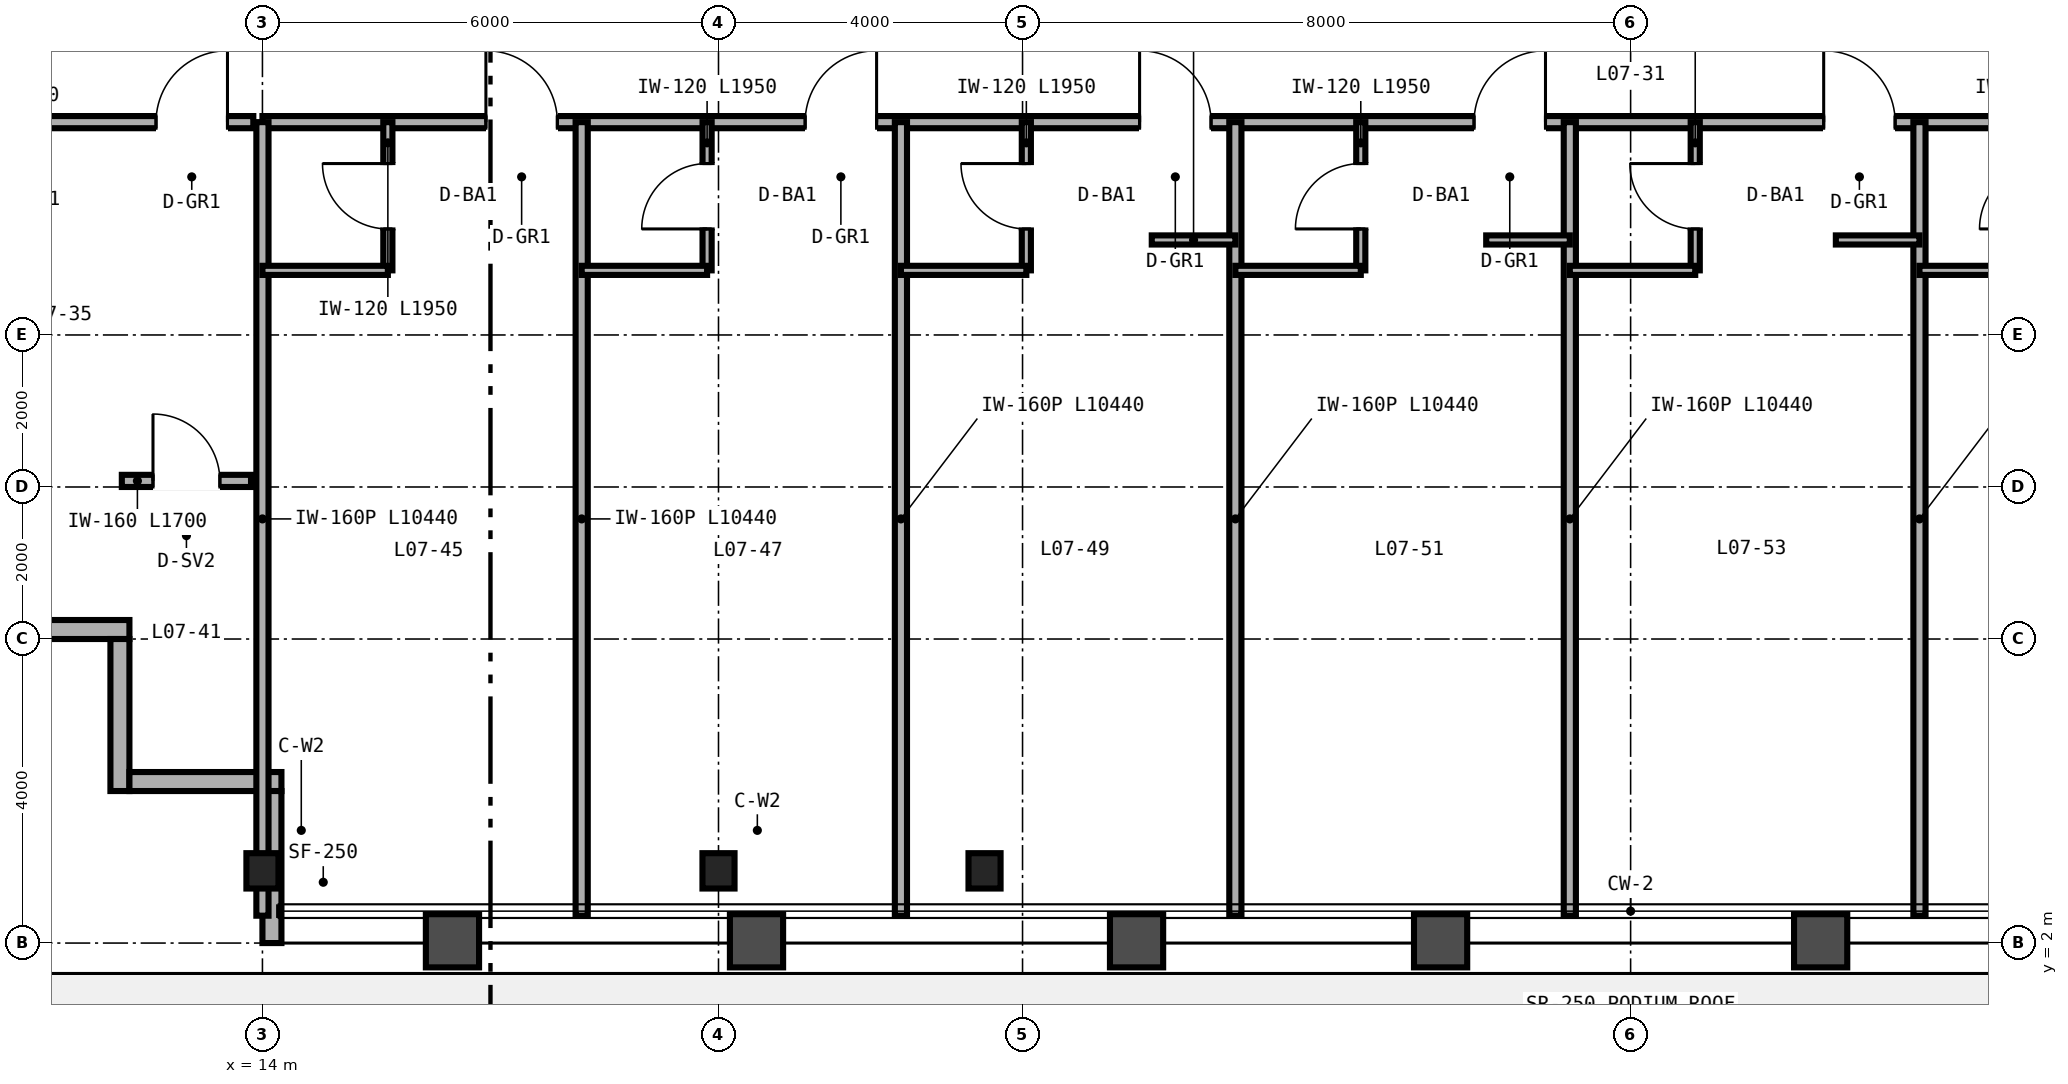
"""IFC4 building model, lengths in metres.
Left out: names, types, materials, properties, quantities, classifications, styles, units other than length and angle.
Written with IfcOpenShell. Run it as: python <this file> out.ifc"""

import sys

from ifc_helpers import new_model, si_unit, direction, frame, frame_2d, origin, origin_2d, place, context, subcontext, project, spatial, rectangle, i_section, extrude, source, transform, mapped, element, fill, save


model = new_model("IFC4")
c1 = context("Model", 3, precision=1e-05, world=origin(), true_north=direction((0.0, 1.0)))
c2 = subcontext(c1, "Body", "Model", "MODEL_VIEW")
j1 = project(units=[si_unit("LENGTHUNIT", "METRE"), si_unit("PLANEANGLEUNIT", "RADIAN")], contexts=[c1])
p1 = place(None, origin())
s1 = spatial("IfcSite", under=j1, at=p1, CompositionType="ELEMENT")
p2 = place(p1, origin())
s2 = spatial("IfcBuilding", under=s1, at=p2, CompositionType="ELEMENT")
p3 = place(p2, frame((0.0, 0.0, 34.8)))
s3 = spatial("IfcBuildingStorey", under=s2, at=p3, CompositionType="ELEMENT", Elevation=34.8)
m1 = source(origin(), c2, "Body", "SweptSolid", [
    extrude(i_section(OverallWidth=0.422, OverallDepth=0.465, WebThickness=0.045, FlangeThickness=0.073, FilletRadius=0.025, at=origin_2d()), origin(), (0.0, 0.0, 1.0), 3.35),
])
for number, where, z_axis, x_axis in (
    (1, (14.0, 2.95, 0.0), (0.0, 0.0, 1.0), (1.0, 0.0, 0.0)),
    (2, (20.0, 2.95, 0.0), (0.0, 0.0, 1.0), (1.0, 0.0, 0.0)),
    (3, (23.5, 2.95, 0.0), (0.0, 0.0, 1.0), (1.0, 0.0, 0.0)),
):
    element("IfcColumn", number, at=place(p3, frame(where, z_axis=z_axis, x_axis=x_axis)), inside=s3, PredefinedType="COLUMN", context=c2, shape_type="MappedRepresentation", body=[
        mapped(m1, transform((0.0, 0.0, 0.0), scale=1.0)),
    ])
for number, where, z_axis, x_axis in (
    (4, (10.25, 6.125, 0.0), (0.0, 0.0, 1.0), (1.0, 0.0, 0.0)),
    (5, (12.125, 6.0, 0.0), (0.0, 0.0, 1.0), (0.0, -1.0, 0.0)),
    (6, (12.25, 4.125, 0.0), (0.0, 0.0, 1.0), (1.0, 0.0, 0.0)),
):
    element("IfcWall", number, at=place(p3, frame(where, z_axis=z_axis, x_axis=x_axis)), inside=s3, PredefinedType="SOLIDWALL", context=c2, shape_type="SweptSolid", body=[
        extrude(rectangle(XDim=2.0, YDim=0.25, at=frame_2d((1.0, 0.0))), origin(), (0.0, 0.0, 1.0), 3.35),
    ])
p4 = place(p3, frame((14.125, 4.0, 0.0), z_axis=(0.0, 0.0, 1.0), x_axis=(0.0, -1.0, 0.0)))
e7 = element("IfcWall", 7, at=p4, inside=s3, PredefinedType="SOLIDWALL", context=c2, shape_type="SweptSolid", body=[
    extrude(rectangle(XDim=2.0, YDim=0.25, at=frame_2d((1.0, 0.0))), origin(), (0.0, 0.0, 1.0), 2.657),
])
p5 = place(p3, frame((8.2, 12.8, 0.0), z_axis=(0.0, 0.0, 1.0), x_axis=(1.0, 0.0, 0.0)))
e8 = element("IfcWall", 8, at=p5, inside=s3, PredefinedType="PARTITIONING", context=c2, shape_type="SweptSolid", body=[
    extrude(rectangle(XDim=5.68, YDim=0.16, at=frame_2d((2.84, 0.0))), origin(), (0.0, 0.0, 1.0), 3.35),
])
p6 = place(p5, frame((4.4, 0.0, 0.0)))
e9 = element("IfcOpeningElement", 9, at=p6, cuts=e8, PredefinedType="OPENING", context=c2, shape_type="SweptSolid", body=[
    extrude(rectangle(XDim=0.94, YDim=2.15, at=frame_2d((0.47, 1.075))), frame((0.0, 0.09, 0.0), z_axis=(0.0, -1.0, 0.0), x_axis=(1.0, 0.0, 0.0)), (0.0, 0.0, 1.0), 0.18),
])
p7 = place(p3, frame((12.15, 8.08, 0.0), z_axis=(0.0, 0.0, 1.0), x_axis=(1.0, 0.0, 0.0)))
e10 = element("IfcWall", 10, at=p7, inside=s3, PredefinedType="PARTITIONING", context=c2, shape_type="SweptSolid", body=[
    extrude(rectangle(XDim=1.7, YDim=0.16, at=frame_2d((0.85, 0.0))), origin(), (0.0, 0.0, 1.0), 3.35),
])
p8 = place(p7, frame((0.41, 0.0, 0.0)))
e11 = element("IfcOpeningElement", 11, at=p8, cuts=e10, PredefinedType="OPENING", context=c2, shape_type="SweptSolid", body=[
    extrude(rectangle(XDim=0.88, YDim=2.15, at=frame_2d((0.44, 1.075))), frame((0.0, 0.09, 0.0), z_axis=(0.0, -1.0, 0.0), x_axis=(1.0, 0.0, 0.0)), (0.0, 0.0, 1.0), 0.18),
])
p9 = place(p3, frame((14.0, 12.8, 0.0), z_axis=(0.0, 0.0, 1.0), x_axis=(1.0, 0.0, 0.0)))
e12 = element("IfcWall", 12, at=p9, inside=s3, PredefinedType="PARTITIONING", context=c2, shape_type="SweptSolid", body=[
    extrude(rectangle(XDim=36.0, YDim=0.16, at=frame_2d((18.0, 0.0))), origin(), (0.0, 0.0, 1.0), 2.571),
])
p10 = place(p9, frame((2.94, 0.0, 0.0)))
e13 = element("IfcOpeningElement", 13, at=p10, cuts=e12, PredefinedType="OPENING", context=c2, shape_type="SweptSolid", body=[
    extrude(rectangle(XDim=0.94, YDim=2.15, at=frame_2d((0.47, 1.075))), frame((0.0, 0.09, 0.0), z_axis=(0.0, -1.0, 0.0), x_axis=(1.0, 0.0, 0.0)), (0.0, 0.0, 1.0), 0.18),
])
p11 = place(p9, frame((7.14, 0.0, 0.0)))
e14 = element("IfcOpeningElement", 14, at=p11, cuts=e12, PredefinedType="OPENING", context=c2, shape_type="SweptSolid", body=[
    extrude(rectangle(XDim=0.94, YDim=2.15, at=frame_2d((0.47, 1.075))), frame((0.0, 0.09, 0.0), z_axis=(0.0, -1.0, 0.0), x_axis=(1.0, 0.0, 0.0)), (0.0, 0.0, 1.0), 0.18),
])
p12 = place(p9, frame((11.54, 0.0, 0.0)))
e15 = element("IfcOpeningElement", 15, at=p12, cuts=e12, PredefinedType="OPENING", context=c2, shape_type="SweptSolid", body=[
    extrude(rectangle(XDim=0.94, YDim=2.15, at=frame_2d((0.47, 1.075))), frame((0.0, 0.09, 0.0), z_axis=(0.0, -1.0, 0.0), x_axis=(1.0, 0.0, 0.0)), (0.0, 0.0, 1.0), 0.18),
])
p13 = place(p9, frame((15.94, 0.0, 0.0)))
e16 = element("IfcOpeningElement", 16, at=p13, cuts=e12, PredefinedType="OPENING", context=c2, shape_type="SweptSolid", body=[
    extrude(rectangle(XDim=0.94, YDim=2.15, at=frame_2d((0.47, 1.075))), frame((0.0, 0.09, 0.0), z_axis=(0.0, -1.0, 0.0), x_axis=(1.0, 0.0, 0.0)), (0.0, 0.0, 1.0), 0.18),
])
p14 = place(p9, frame((20.54, 0.0, 0.0)))
e17 = element("IfcOpeningElement", 17, at=p14, cuts=e12, PredefinedType="OPENING", context=c2, shape_type="SweptSolid", body=[
    extrude(rectangle(XDim=0.94, YDim=2.15, at=frame_2d((0.47, 1.075))), frame((0.0, 0.09, 0.0), z_axis=(0.0, -1.0, 0.0), x_axis=(1.0, 0.0, 0.0)), (0.0, 0.0, 1.0), 0.18),
])
p15 = place(p9, frame((24.84, 0.0, 0.0)))
e18 = element("IfcOpeningElement", 18, at=p15, cuts=e12, PredefinedType="OPENING", context=c2, shape_type="SweptSolid", body=[
    extrude(rectangle(XDim=0.94, YDim=2.15, at=frame_2d((0.47, 1.075))), frame((0.0, 0.09, 0.0), z_axis=(0.0, -1.0, 0.0), x_axis=(1.0, 0.0, 0.0)), (0.0, 0.0, 1.0), 0.18),
])
p16 = place(p9, frame((29.94, 0.0, 0.0)))
e19 = element("IfcOpeningElement", 19, at=p16, cuts=e12, PredefinedType="OPENING", context=c2, shape_type="SweptSolid", body=[
    extrude(rectangle(XDim=0.94, YDim=2.15, at=frame_2d((0.47, 1.075))), frame((0.0, 0.09, 0.0), z_axis=(0.0, -1.0, 0.0), x_axis=(1.0, 0.0, 0.0)), (0.0, 0.0, 1.0), 0.18),
])
p17 = place(p9, frame((34.74, 0.0, 0.0)))
e20 = element("IfcOpeningElement", 20, at=p17, cuts=e12, PredefinedType="OPENING", context=c2, shape_type="SweptSolid", body=[
    extrude(rectangle(XDim=0.94, YDim=2.15, at=frame_2d((0.47, 1.075))), frame((0.0, 0.09, 0.0), z_axis=(0.0, -1.0, 0.0), x_axis=(1.0, 0.0, 0.0)), (0.0, 0.0, 1.0), 0.18),
])
for number, where, z_axis, x_axis in (
    (21, (14.0, 2.36, 0.0), (0.0, 0.0, 1.0), (0.0, 1.0, 0.0)),
    (22, (18.2, 2.36, 0.0), (0.0, 0.0, 1.0), (0.0, 1.0, 0.0)),
):
    element("IfcWall", number, at=place(p3, frame(where, z_axis=z_axis, x_axis=x_axis)), inside=s3, PredefinedType="PARTITIONING", context=c2, shape_type="SweptSolid", body=[
        extrude(rectangle(XDim=10.44, YDim=0.16, at=frame_2d((5.22, 0.0))), origin(), (0.0, 0.0, 1.0), 2.657),
    ])
p18 = place(p3, frame((15.65, 10.85, 0.0), z_axis=(0.0, 0.0, 1.0), x_axis=(0.0, 1.0, 0.0)))
e23 = element("IfcWall", 23, at=p18, inside=s3, PredefinedType="PARTITIONING", context=c2, shape_type="SweptSolid", body=[
    extrude(rectangle(XDim=1.95, YDim=0.12, at=frame_2d((0.975, 0.0))), origin(), (0.0, 0.0, 1.0), 3.35),
])
p19 = place(p18, frame((0.545, 0.0, 0.0)))
e24 = element("IfcOpeningElement", 24, at=p19, cuts=e23, PredefinedType="OPENING", context=c2, shape_type="SweptSolid", body=[
    extrude(rectangle(XDim=0.86, YDim=2.1, at=frame_2d((0.43, 1.05))), frame((0.0, 0.07, 0.0), z_axis=(0.0, -1.0, 0.0), x_axis=(1.0, 0.0, 0.0)), (0.0, 0.0, 1.0), 0.14),
])
p20 = place(p3, frame((14.0, 10.85, 0.0), z_axis=(0.0, 0.0, 1.0), x_axis=(1.0, 0.0, 0.0)))
e25 = element("IfcWall", 25, at=p20, inside=s3, PredefinedType="PARTITIONING", context=c2, shape_type="SweptSolid", body=[
    extrude(rectangle(XDim=1.65, YDim=0.12, at=frame_2d((0.825, 0.0))), origin(), (0.0, 0.0, 1.0), 3.35),
])
p21 = place(p3, frame((22.4, 2.36, 0.0), z_axis=(0.0, 0.0, 1.0), x_axis=(0.0, 1.0, 0.0)))
e26 = element("IfcWall", 26, at=p21, inside=s3, PredefinedType="PARTITIONING", context=c2, shape_type="SweptSolid", body=[
    extrude(rectangle(XDim=10.44, YDim=0.16, at=frame_2d((5.22, 0.0))), origin(), (0.0, 0.0, 1.0), 2.813),
])
p22 = place(p3, frame((19.85, 10.85, 0.0), z_axis=(0.0, 0.0, 1.0), x_axis=(0.0, 1.0, 0.0)))
e27 = element("IfcWall", 27, at=p22, inside=s3, PredefinedType="PARTITIONING", context=c2, shape_type="SweptSolid", body=[
    extrude(rectangle(XDim=1.95, YDim=0.12, at=frame_2d((0.975, 0.0))), origin(), (0.0, 0.0, 1.0), 3.35),
])
p23 = place(p22, frame((0.545, 0.0, 0.0)))
e28 = element("IfcOpeningElement", 28, at=p23, cuts=e27, PredefinedType="OPENING", context=c2, shape_type="SweptSolid", body=[
    extrude(rectangle(XDim=0.86, YDim=2.1, at=frame_2d((0.43, 1.05))), frame((0.0, 0.07, 0.0), z_axis=(0.0, -1.0, 0.0), x_axis=(1.0, 0.0, 0.0)), (0.0, 0.0, 1.0), 0.14),
])
p24 = place(p3, frame((18.2, 10.85, 0.0), z_axis=(0.0, 0.0, 1.0), x_axis=(1.0, 0.0, 0.0)))
e29 = element("IfcWall", 29, at=p24, inside=s3, PredefinedType="PARTITIONING", context=c2, shape_type="SweptSolid", body=[
    extrude(rectangle(XDim=1.65, YDim=0.12, at=frame_2d((0.825, 0.0))), origin(), (0.0, 0.0, 1.0), 3.35),
])
p25 = place(p3, frame((26.8, 2.36, 0.0), z_axis=(0.0, 0.0, 1.0), x_axis=(0.0, 1.0, 0.0)))
e30 = element("IfcWall", 30, at=p25, inside=s3, PredefinedType="PARTITIONING", context=c2, shape_type="SweptSolid", body=[
    extrude(rectangle(XDim=10.44, YDim=0.16, at=frame_2d((5.22, 0.0))), origin(), (0.0, 0.0, 1.0), 2.423),
])
p26 = place(p3, frame((24.05, 10.85, 0.0), z_axis=(0.0, 0.0, 1.0), x_axis=(0.0, 1.0, 0.0)))
e31 = element("IfcWall", 31, at=p26, inside=s3, PredefinedType="PARTITIONING", context=c2, shape_type="SweptSolid", body=[
    extrude(rectangle(XDim=1.95, YDim=0.12, at=frame_2d((0.975, 0.0))), origin(), (0.0, 0.0, 1.0), 3.35),
])
p27 = place(p26, frame((0.545, 0.0, 0.0)))
e32 = element("IfcOpeningElement", 32, at=p27, cuts=e31, PredefinedType="OPENING", context=c2, shape_type="SweptSolid", body=[
    extrude(rectangle(XDim=0.86, YDim=2.1, at=frame_2d((0.43, 1.05))), frame((0.0, 0.07, 0.0), z_axis=(0.0, -1.0, 0.0), x_axis=(1.0, 0.0, 0.0)), (0.0, 0.0, 1.0), 0.14),
])
p28 = place(p3, frame((22.4, 10.85, 0.0), z_axis=(0.0, 0.0, 1.0), x_axis=(1.0, 0.0, 0.0)))
e33 = element("IfcWall", 33, at=p28, inside=s3, PredefinedType="PARTITIONING", context=c2, shape_type="SweptSolid", body=[
    extrude(rectangle(XDim=1.65, YDim=0.12, at=frame_2d((0.825, 0.0))), origin(), (0.0, 0.0, 1.0), 2.571),
])
p29 = place(p3, frame((25.7, 11.25, 0.0), z_axis=(0.0, 0.0, 1.0), x_axis=(1.0, 0.0, 0.0)))
e34 = element("IfcWall", 34, at=p29, inside=s3, PredefinedType="PARTITIONING", context=c2, shape_type="SweptSolid", body=[
    extrude(rectangle(XDim=1.1, YDim=0.12, at=frame_2d((0.55, 0.0))), origin(), (0.0, 0.0, 1.0), 3.35),
])
p30 = place(p3, frame((31.2, 2.36, 0.0), z_axis=(0.0, 0.0, 1.0), x_axis=(0.0, 1.0, 0.0)))
e35 = element("IfcWall", 35, at=p30, inside=s3, PredefinedType="PARTITIONING", context=c2, shape_type="SweptSolid", body=[
    extrude(rectangle(XDim=10.44, YDim=0.16, at=frame_2d((5.22, 0.0))), origin(), (0.0, 0.0, 1.0), 2.423),
])
p31 = place(p3, frame((28.45, 10.85, 0.0), z_axis=(0.0, 0.0, 1.0), x_axis=(0.0, 1.0, 0.0)))
e36 = element("IfcWall", 36, at=p31, inside=s3, PredefinedType="PARTITIONING", context=c2, shape_type="SweptSolid", body=[
    extrude(rectangle(XDim=1.95, YDim=0.12, at=frame_2d((0.975, 0.0))), origin(), (0.0, 0.0, 1.0), 3.35),
])
p32 = place(p31, frame((0.545, 0.0, 0.0)))
e37 = element("IfcOpeningElement", 37, at=p32, cuts=e36, PredefinedType="OPENING", context=c2, shape_type="SweptSolid", body=[
    extrude(rectangle(XDim=0.86, YDim=2.1, at=frame_2d((0.43, 1.05))), frame((0.0, 0.07, 0.0), z_axis=(0.0, -1.0, 0.0), x_axis=(1.0, 0.0, 0.0)), (0.0, 0.0, 1.0), 0.14),
])
p33 = place(p3, frame((26.8, 10.85, 0.0), z_axis=(0.0, 0.0, 1.0), x_axis=(1.0, 0.0, 0.0)))
e38 = element("IfcWall", 38, at=p33, inside=s3, PredefinedType="PARTITIONING", context=c2, shape_type="SweptSolid", body=[
    extrude(rectangle(XDim=1.65, YDim=0.12, at=frame_2d((0.825, 0.0))), origin(), (0.0, 0.0, 1.0), 3.35),
])
p34 = place(p3, frame((30.1, 11.25, 0.0), z_axis=(0.0, 0.0, 1.0), x_axis=(1.0, 0.0, 0.0)))
e39 = element("IfcWall", 39, at=p34, inside=s3, PredefinedType="PARTITIONING", context=c2, shape_type="SweptSolid", body=[
    extrude(rectangle(XDim=1.1, YDim=0.12, at=frame_2d((0.55, 0.0))), origin(), (0.0, 0.0, 1.0), 3.35),
])
p35 = place(p3, frame((35.8, 2.36, 0.0), z_axis=(0.0, 0.0, 1.0), x_axis=(0.0, 1.0, 0.0)))
e40 = element("IfcWall", 40, at=p35, inside=s3, PredefinedType="PARTITIONING", context=c2, shape_type="SweptSolid", body=[
    extrude(rectangle(XDim=10.44, YDim=0.16, at=frame_2d((5.22, 0.0))), origin(), (0.0, 0.0, 1.0), 2.423),
])
p36 = place(p3, frame((32.85, 10.85, 0.0), z_axis=(0.0, 0.0, 1.0), x_axis=(0.0, 1.0, 0.0)))
e41 = element("IfcWall", 41, at=p36, inside=s3, PredefinedType="PARTITIONING", context=c2, shape_type="SweptSolid", body=[
    extrude(rectangle(XDim=1.95, YDim=0.12, at=frame_2d((0.975, 0.0))), origin(), (0.0, 0.0, 1.0), 3.35),
])
p37 = place(p36, frame((0.545, 0.0, 0.0)))
e42 = element("IfcOpeningElement", 42, at=p37, cuts=e41, PredefinedType="OPENING", context=c2, shape_type="SweptSolid", body=[
    extrude(rectangle(XDim=0.86, YDim=2.1, at=frame_2d((0.43, 1.05))), frame((0.0, 0.07, 0.0), z_axis=(0.0, -1.0, 0.0), x_axis=(1.0, 0.0, 0.0)), (0.0, 0.0, 1.0), 0.14),
])
p38 = place(p3, frame((31.2, 10.85, 0.0), z_axis=(0.0, 0.0, 1.0), x_axis=(1.0, 0.0, 0.0)))
e43 = element("IfcWall", 43, at=p38, inside=s3, PredefinedType="PARTITIONING", context=c2, shape_type="SweptSolid", body=[
    extrude(rectangle(XDim=1.65, YDim=0.12, at=frame_2d((0.825, 0.0))), origin(), (0.0, 0.0, 1.0), 3.35),
])
p39 = place(p3, frame((34.7, 11.25, 0.0), z_axis=(0.0, 0.0, 1.0), x_axis=(1.0, 0.0, 0.0)))
e44 = element("IfcWall", 44, at=p39, inside=s3, PredefinedType="PARTITIONING", context=c2, shape_type="SweptSolid", body=[
    extrude(rectangle(XDim=1.1, YDim=0.12, at=frame_2d((0.55, 0.0))), origin(), (0.0, 0.0, 1.0), 3.35),
])
p40 = place(p3, frame((35.8, 10.85, 0.0), z_axis=(0.0, 0.0, 1.0), x_axis=(1.0, 0.0, 0.0)))
e45 = element("IfcWall", 45, at=p40, inside=s3, PredefinedType="PARTITIONING", context=c2, shape_type="SweptSolid", body=[
    extrude(rectangle(XDim=1.65, YDim=0.12, at=frame_2d((0.825, 0.0))), origin(), (0.0, 0.0, 1.0), 3.35),
])
m2 = source(origin(), c2, "Body", "SweptSolid", [
    extrude(rectangle(XDim=0.94, YDim=2.15, at=frame_2d((0.47, 1.075))), frame((0.0, 0.025, 0.0), z_axis=(0.0, -1.0, 0.0), x_axis=(1.0, 0.0, 0.0)), (0.0, 0.0, 1.0), 0.05),
])
p41 = place(p6, origin())
e46 = element("IfcDoor", 46, at=p41, inside=s3, OperationType="SINGLE_SWING_RIGHT", PredefinedType="DOOR", context=c2, shape_type="MappedRepresentation", body=[
    mapped(m2, transform((0.0, 0.0, 0.0), scale=1.0)),
])
fill(e9, e46)
m3 = source(origin(), c2, "Body", "SweptSolid", [
    extrude(rectangle(XDim=0.88, YDim=2.15, at=frame_2d((0.44, 1.075))), frame((0.0, 0.025, 0.0), z_axis=(0.0, -1.0, 0.0), x_axis=(1.0, 0.0, 0.0)), (0.0, 0.0, 1.0), 0.05),
])
p42 = place(p8, origin())
e47 = element("IfcDoor", 47, at=p42, inside=s3, OperationType="SINGLE_SWING_LEFT", PredefinedType="DOOR", context=c2, shape_type="MappedRepresentation", body=[
    mapped(m3, transform((0.0, 0.0, 0.0), scale=1.0)),
])
fill(e11, e47)
m4 = source(origin(), c2, "Body", "SweptSolid", [
    extrude(rectangle(XDim=0.86, YDim=2.1, at=frame_2d((0.43, 1.05))), frame((0.0, 0.025, 0.0), z_axis=(0.0, -1.0, 0.0), x_axis=(1.0, 0.0, 0.0)), (0.0, 0.0, 1.0), 0.05),
])
p43 = place(p19, origin())
e48 = element("IfcDoor", 48, at=p43, inside=s3, OperationType="SINGLE_SWING_RIGHT", PredefinedType="DOOR", context=c2, shape_type="MappedRepresentation", body=[
    mapped(m4, transform((0.0, 0.0, 0.0), scale=1.0)),
])
fill(e24, e48)
p44 = place(p23, origin())
e49 = element("IfcDoor", 49, at=p44, inside=s3, OperationType="SINGLE_SWING_LEFT", PredefinedType="DOOR", context=c2, shape_type="MappedRepresentation", body=[
    mapped(m4, transform((0.0, 0.0, 0.0), scale=1.0)),
])
fill(e28, e49)
p45 = place(p27, origin())
e50 = element("IfcDoor", 50, at=p45, inside=s3, OperationType="SINGLE_SWING_RIGHT", PredefinedType="DOOR", context=c2, shape_type="MappedRepresentation", body=[
    mapped(m4, transform((0.0, 0.0, 0.0), scale=1.0)),
])
fill(e32, e50)
p46 = place(p32, origin())
e51 = element("IfcDoor", 51, at=p46, inside=s3, OperationType="SINGLE_SWING_LEFT", PredefinedType="DOOR", context=c2, shape_type="MappedRepresentation", body=[
    mapped(m4, transform((0.0, 0.0, 0.0), scale=1.0)),
])
fill(e37, e51)
p47 = place(p37, origin())
e52 = element("IfcDoor", 52, at=p47, inside=s3, OperationType="SINGLE_SWING_RIGHT", PredefinedType="DOOR", context=c2, shape_type="MappedRepresentation", body=[
    mapped(m4, transform((0.0, 0.0, 0.0), scale=1.0)),
])
fill(e42, e52)
p48 = place(p10, origin())
e53 = element("IfcDoor", 53, at=p48, inside=s3, OperationType="SINGLE_SWING_LEFT", PredefinedType="DOOR", context=c2, shape_type="MappedRepresentation", body=[
    mapped(m2, transform((0.0, 0.0, 0.0), scale=1.0)),
])
fill(e13, e53)
p49 = place(p11, origin())
e54 = element("IfcDoor", 54, at=p49, inside=s3, OperationType="SINGLE_SWING_RIGHT", PredefinedType="DOOR", context=c2, shape_type="MappedRepresentation", body=[
    mapped(m2, transform((0.0, 0.0, 0.0), scale=1.0)),
])
fill(e14, e54)
p50 = place(p12, origin())
e55 = element("IfcDoor", 55, at=p50, inside=s3, OperationType="SINGLE_SWING_LEFT", PredefinedType="DOOR", context=c2, shape_type="MappedRepresentation", body=[
    mapped(m2, transform((0.0, 0.0, 0.0), scale=1.0)),
])
fill(e15, e55)
p51 = place(p13, origin())
e56 = element("IfcDoor", 56, at=p51, inside=s3, OperationType="SINGLE_SWING_RIGHT", PredefinedType="DOOR", context=c2, shape_type="MappedRepresentation", body=[
    mapped(m2, transform((0.0, 0.0, 0.0), scale=1.0)),
])
fill(e16, e56)
p52 = place(p14, origin())
e57 = element("IfcDoor", 57, at=p52, inside=s3, OperationType="SINGLE_SWING_LEFT", PredefinedType="DOOR", context=c2, shape_type="MappedRepresentation", body=[
    mapped(m2, transform((0.0, 0.0, 0.0), scale=1.0)),
])
fill(e17, e57)
save(model, sys.argv[1])
